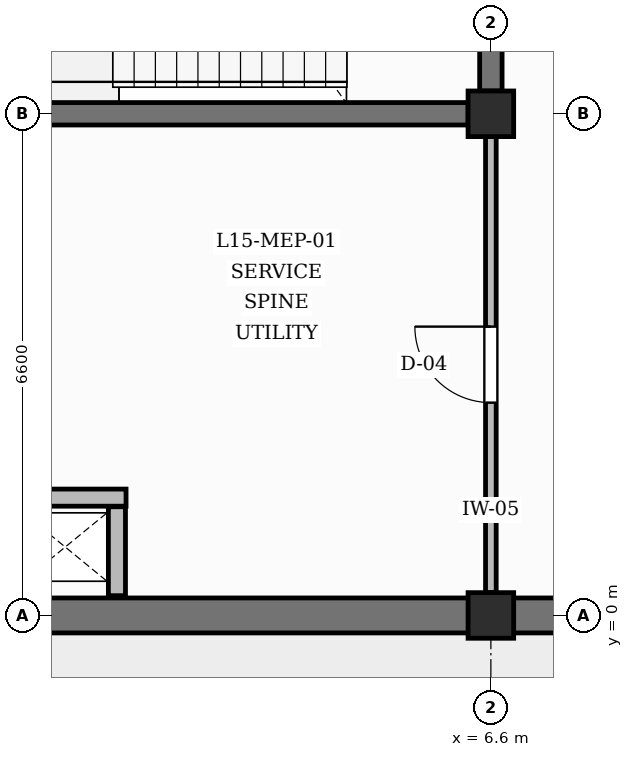
"""IFC4 building model, lengths in metres.
Left out: names, types, materials, properties, quantities, classifications, styles, units other than length and angle.
Written with IfcOpenShell. Run it as: python <this file> out.ifc"""

import sys

from ifc_helpers import new_model, si_unit, direction, frame, frame_2d, origin, origin_2d, place, context, subcontext, project, spatial, rectangle, extrude, element, fill, save


model = new_model("IFC4")
c1 = context("Model", 3, precision=1e-05, world=origin(), true_north=direction((0.0, 1.0)))
c2 = subcontext(c1, "Body", "Model", "MODEL_VIEW")
j1 = project(units=[si_unit("LENGTHUNIT", "METRE"), si_unit("PLANEANGLEUNIT", "RADIAN")], contexts=[c1])
p1 = place(None, origin())
s1 = spatial("IfcSite", under=j1, at=p1, CompositionType="ELEMENT")
p2 = place(p1, origin())
s2 = spatial("IfcBuilding", under=s1, at=p2, CompositionType="ELEMENT")
p3 = place(p2, frame((0.0, 0.0, 64.8)))
s3 = spatial("IfcBuildingStorey", under=s2, at=p3, CompositionType="ELEMENT", Elevation=64.8)
for number, where, z_axis, x_axis in (
    (1, (6.6, 0.0, 0.0), (0.0, 0.0, 1.0), (1.0, 0.0, 0.0)),
    (2, (6.6, 6.6, 0.0), (0.0, 0.0, 1.0), (1.0, 0.0, 0.0)),
):
    element("IfcColumn", number, at=place(p3, frame(where, z_axis=z_axis, x_axis=x_axis)), inside=s3, PredefinedType="COLUMN", context=c2, shape_type="SweptSolid", body=[
        extrude(rectangle(XDim=0.6, YDim=0.6, at=origin_2d()), origin(), (0.0, 0.0, 1.0), 4.2),
    ])
for number, where, z_axis, x_axis in (
    (3, (0.3, 0.0, 0.0), (0.0, 0.0, 1.0), (1.0, 0.0, 0.0)),
    (4, (6.9, 0.0, 0.0), (0.0, 0.0, 1.0), (1.0, 0.0, 0.0)),
):
    element("IfcWall", number, at=place(p3, frame(where, z_axis=z_axis, x_axis=x_axis)), inside=s3, PredefinedType="SOLIDWALL", context=c2, shape_type="SweptSolid", body=[
        extrude(rectangle(XDim=6.0, YDim=0.46, at=frame_2d((3.0, 0.0))), origin(), (0.0, 0.0, 1.0), 3.3),
    ])
p4 = place(p3, frame((0.3, 6.6, 0.0), z_axis=(0.0, 0.0, 1.0), x_axis=(1.0, 0.0, 0.0)))
e5 = element("IfcWall", 5, at=p4, inside=s3, PredefinedType="SHEAR", context=c2, shape_type="SweptSolid", body=[
    extrude(rectangle(XDim=6.0, YDim=0.295, at=frame_2d((3.0, 0.0))), origin(), (0.0, 0.0, 1.0), 3.3),
])
p5 = place(p3, frame((6.6, 6.9, 0.0), z_axis=(0.0, 0.0, 1.0), x_axis=(0.0, 1.0, 0.0)))
e6 = element("IfcWall", 6, at=p5, inside=s3, PredefinedType="SHEAR", context=c2, shape_type="SweptSolid", body=[
    extrude(rectangle(XDim=6.0, YDim=0.295, at=frame_2d((3.0, 0.0))), origin(), (0.0, 0.0, 1.0), 3.3),
])
p6 = place(p5, frame((2.45, 0.0, 0.0)))
e7 = element("IfcOpeningElement", 7, at=p6, cuts=e6, PredefinedType="OPENING", context=c2, shape_type="SweptSolid", body=[
    extrude(rectangle(XDim=1.1, YDim=2.15, at=frame_2d((0.55, 1.075))), frame((0.0, 0.157, 0.0), z_axis=(0.0, -1.0, 0.0), x_axis=(1.0, 0.0, 0.0)), (0.0, 0.0, 1.0), 0.315),
])
p7 = place(p3, frame((1.68, 0.26, 0.0), z_axis=(0.0, 0.0, 1.0), x_axis=(0.0, 1.0, 0.0)))
e8 = element("IfcWall", 8, at=p7, inside=s3, PredefinedType="PARTITIONING", context=c2, shape_type="SweptSolid", body=[
    extrude(rectangle(XDim=1.17, YDim=0.225, at=frame_2d((0.585, 0.0))), origin(), (0.0, 0.0, 1.0), 3.9),
])
p8 = place(p3, frame((0.26, 1.55, 0.0), z_axis=(0.0, 0.0, 1.0), x_axis=(1.0, 0.0, 0.0)))
e9 = element("IfcWall", 9, at=p8, inside=s3, PredefinedType="PARTITIONING", context=c2, shape_type="SweptSolid", body=[
    extrude(rectangle(XDim=1.54, YDim=0.225, at=frame_2d((0.77, 0.0))), origin(), (0.0, 0.0, 1.0), 3.9),
])
p9 = place(p3, frame((6.6, 0.3, 0.0), z_axis=(0.0, 0.0, 1.0), x_axis=(0.0, 1.0, 0.0)))
e10 = element("IfcWall", 10, at=p9, inside=s3, PredefinedType="PARTITIONING", context=c2, shape_type="SweptSolid", body=[
    extrude(rectangle(XDim=6.0, YDim=0.14, at=frame_2d((3.0, 0.0))), origin(), (0.0, 0.0, 1.0), 3.3),
])
p10 = place(p9, frame((2.5, 0.0, 0.0)))
e11 = element("IfcOpeningElement", 11, at=p10, cuts=e10, PredefinedType="OPENING", context=c2, shape_type="SweptSolid", body=[
    extrude(rectangle(XDim=1.0, YDim=2.1, at=frame_2d((0.5, 1.05))), frame((0.0, 0.08, 0.0), z_axis=(0.0, -1.0, 0.0), x_axis=(1.0, 0.0, 0.0)), (0.0, 0.0, 1.0), 0.16),
])
p11 = place(p10, origin())
e12 = element("IfcDoor", 12, at=p11, inside=s3, OperationType="SINGLE_SWING_RIGHT", PredefinedType="DOOR", context=c2, shape_type="SweptSolid", body=[
    extrude(rectangle(XDim=1.0, YDim=2.1, at=frame_2d((0.5, 1.05))), frame((0.0, 0.025, 0.0), z_axis=(0.0, -1.0, 0.0), x_axis=(1.0, 0.0, 0.0)), (0.0, 0.0, 1.0), 0.05),
])
fill(e11, e12)
save(model, sys.argv[1])
